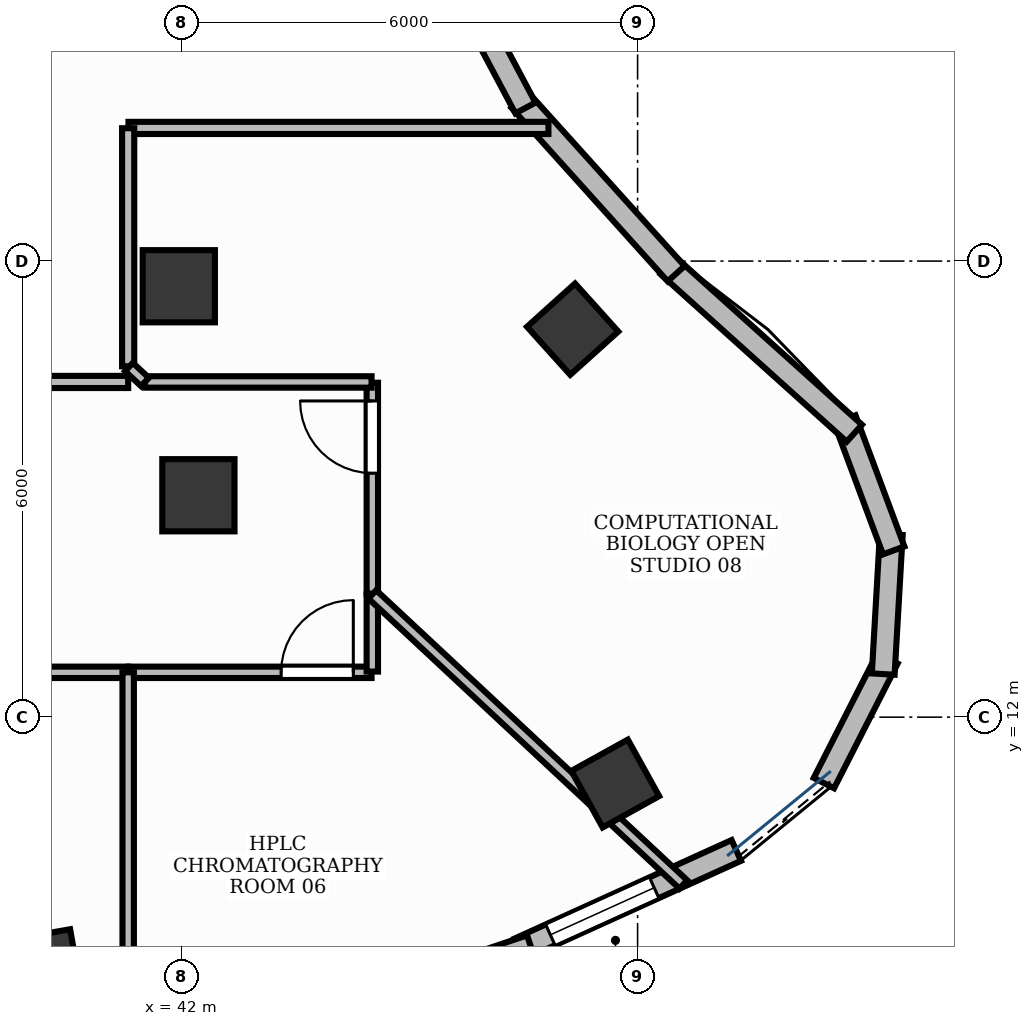
"""IFC4 building model, lengths in metres.
Left out: names, types, materials, properties, quantities, classifications, styles, units other than length and angle.
Written with IfcOpenShell. Run it as: python <this file> out.ifc"""

import sys

from ifc_helpers import new_model, si_unit, direction, frame, frame_2d, origin, origin_2d, place, context, subcontext, project, spatial, rectangle, extrude, element, fill, save


model = new_model("IFC4")
c1 = context("Model", 3, precision=1e-05, world=origin(), true_north=direction((0.0, 1.0)))
c2 = subcontext(c1, "Body", "Model", "MODEL_VIEW")
j1 = project(units=[si_unit("LENGTHUNIT", "METRE"), si_unit("PLANEANGLEUNIT", "RADIAN")], contexts=[c1])
p1 = place(None, origin())
s1 = spatial("IfcSite", under=j1, at=p1, CompositionType="ELEMENT")
p2 = place(p1, origin())
s2 = spatial("IfcBuilding", under=s1, at=p2, CompositionType="ELEMENT")
p3 = place(p2, frame((0.0, 0.0, 260.4)))
s3 = spatial("IfcBuildingStorey", under=s2, at=p3, CompositionType="ELEMENT", Elevation=260.4)
for number, where, z_axis, x_axis in (
    (1, (40.189, 8.718, -0.0), (0.0, 0.0, 1.0), (0.985, 0.173, 0.0)),
    (2, (47.706, 11.127, -0.0), (0.0, 0.0, 1.0), (0.875, 0.485, 0.0)),
):
    element("IfcColumn", number, at=place(p3, frame(where, z_axis=z_axis, x_axis=x_axis)), inside=s3, PredefinedType="COLUMN", context=c2, shape_type="SweptSolid", body=[
        extrude(rectangle(XDim=0.85, YDim=0.85, at=origin_2d()), origin(), (0.0, 0.0, 1.0), 3.901),
    ])
p4 = place(p3, frame((42.222, 14.919, -0.0), z_axis=(0.0, 0.0, 1.0), x_axis=(1.0, 0.0, 0.0)))
e3 = element("IfcColumn", 3, at=p4, inside=s3, PredefinedType="COLUMN", context=c2, shape_type="SweptSolid", body=[
    extrude(rectangle(XDim=0.95, YDim=0.95, at=origin_2d()), origin(), (0.0, 0.0, 1.0), 3.901),
])
p5 = place(p3, frame((47.146, 17.104, -0.0), z_axis=(0.0, 0.0, 1.0), x_axis=(-0.669130606359, 0.743144825477, 0.0)))
e4 = element("IfcColumn", 4, at=p5, inside=s3, PredefinedType="COLUMN", context=c2, shape_type="SweptSolid", body=[
    extrude(rectangle(XDim=0.85, YDim=0.85, at=origin_2d()), origin(), (0.0, 0.0, 1.0), 3.901),
])
p6 = place(p3, frame((41.964, 17.669, -0.0), z_axis=(0.0, 0.0, 1.0), x_axis=(1.0, 0.0, 0.0)))
e5 = element("IfcColumn", 5, at=p6, inside=s3, PredefinedType="COLUMN", context=c2, shape_type="SweptSolid", body=[
    extrude(rectangle(XDim=0.95, YDim=0.95, at=origin_2d()), origin(), (0.0, 0.0, 1.0), 3.901),
])
p7 = place(p3, frame((46.442, 8.95, 0.0), z_axis=(0.0, 0.0, 1.0), x_axis=(0.910590214511, 0.413310369137, 0.0)))
e6 = element("IfcWall", 6, at=p7, inside=s3, PredefinedType="STANDARD", context=c2, shape_type="SweptSolid", body=[
    extrude(rectangle(XDim=3.137, YDim=0.3, at=frame_2d((1.569, 0.0))), origin(), (0.0, 0.0, 1.0), 3.9),
])
p8 = place(p7, frame((0.451, 0.0, 0.95)))
e7 = element("IfcOpeningElement", 7, at=p8, cuts=e6, PredefinedType="OPENING", context=c2, shape_type="SweptSolid", body=[
    extrude(rectangle(XDim=1.5, YDim=1.8, at=frame_2d((0.75, 0.9))), frame((0.0, 0.165, 0.0), z_axis=(0.0, -1.0, 0.0), x_axis=(1.0, 0.0, 0.0)), (0.0, 0.0, 1.0), 0.33),
])
p9 = place(p3, frame((43.52, 7.951, 0.0), z_axis=(0.0, 0.0, 1.0), x_axis=(0.94763187211, 0.319364736566, 0.0)))
e8 = element("IfcWall", 8, at=p9, inside=s3, PredefinedType="STANDARD", context=c2, shape_type="SweptSolid", body=[
    extrude(rectangle(XDim=3.244, YDim=0.3, at=frame_2d((1.622, 0.0))), origin(), (0.0, 0.0, 1.0), 3.9),
])
for number, where, z_axis, x_axis in (
    (9, (50.451, 11.133, 0.0), (0.0, 0.0, 1.0), (0.454, 0.891, 0.0)),
    (10, (51.232, 12.567, 0.0), (0.0, 0.0, 1.0), (0.057, 0.998, 0.0)),
    (11, (51.369, 14.194, 0.0), (0.0, 0.0, 1.0), (-0.349, 0.937, 0.0)),
):
    element("IfcWall", number, at=place(p3, frame(where, z_axis=z_axis, x_axis=x_axis)), inside=s3, PredefinedType="STANDARD", context=c2, shape_type="SweptSolid", body=[
        extrude(rectangle(XDim=1.842, YDim=0.3, at=frame_2d((0.921, 0.0))), origin(), (0.0, 0.0, 1.0), 3.9),
    ])
p10 = place(p3, frame((50.852, 15.736, 0.0), z_axis=(0.0, 0.0, 1.0), x_axis=(-0.743397410822, 0.668849975393, 0.0)))
e12 = element("IfcWall", 12, at=p10, inside=s3, PredefinedType="STANDARD", context=c2, shape_type="SweptSolid", body=[
    extrude(rectangle(XDim=3.291, YDim=0.3, at=frame_2d((1.646, 0.0))), origin(), (0.0, 0.0, 1.0), 3.9),
])
p11 = place(p3, frame((48.508, 17.835, 0.0), z_axis=(0.0, 0.0, 1.0), x_axis=(-0.669127242861, 0.743147853971, 0.0)))
e13 = element("IfcWall", 13, at=p11, inside=s3, PredefinedType="STANDARD", context=c2, shape_type="SweptSolid", body=[
    extrude(rectangle(XDim=3.071, YDim=0.3, at=frame_2d((1.535, 0.0))), origin(), (0.0, 0.0, 1.0), 3.9),
])
p12 = place(p3, frame((46.524, 20.014, 0.0), z_axis=(0.0, 0.0, 1.0), x_axis=(-0.469494296004, 0.882935505017, 0.0)))
e14 = element("IfcWall", 14, at=p12, inside=s3, PredefinedType="STANDARD", context=c2, shape_type="SweptSolid", body=[
    extrude(rectangle(XDim=3.071, YDim=0.3, at=frame_2d((1.535, 0.0))), origin(), (0.0, 0.0, 1.0), 3.9),
])
p13 = place(p3, frame((29.765, 12.59, 0.0), z_axis=(0.0, 0.0, 1.0), x_axis=(1.0, 0.0, 0.0)))
e15 = element("IfcWall", 15, at=p13, inside=s3, PredefinedType="PARTITIONING", context=c2, shape_type="SweptSolid", body=[
    extrude(rectangle(XDim=11.533, YDim=0.15, at=frame_2d((5.767, 0.0))), origin(), (0.0, 0.0, 1.0), 2.91),
])
p14 = place(p13, frame((0.24, 0.0, 0.0)))
e16 = element("IfcOpeningElement", 16, at=p14, cuts=e15, PredefinedType="OPENING", context=c2, shape_type="SweptSolid", body=[
    extrude(rectangle(XDim=0.95, YDim=2.15, at=frame_2d((0.475, 1.075))), frame((0.0, 0.09, 0.0), z_axis=(0.0, -1.0, 0.0), x_axis=(1.0, 0.0, 0.0)), (0.0, 0.0, 1.0), 0.18),
])
p15 = place(p3, frame((41.308, 12.59, 0.0), z_axis=(0.0, 0.0, 1.0), x_axis=(1.0, 0.0, 0.0)))
e17 = element("IfcWall", 17, at=p15, inside=s3, PredefinedType="PARTITIONING", context=c2, shape_type="SweptSolid", body=[
    extrude(rectangle(XDim=3.192, YDim=0.15, at=frame_2d((1.596, 0.0))), origin(), (0.0, 0.0, 1.0), 2.91),
])
p16 = place(p15, frame((2.002, 0.0, 0.0)))
e18 = element("IfcOpeningElement", 18, at=p16, cuts=e17, PredefinedType="OPENING", context=c2, shape_type="SweptSolid", body=[
    extrude(rectangle(XDim=0.95, YDim=2.15, at=frame_2d((0.475, 1.075))), frame((0.0, 0.09, 0.0), z_axis=(0.0, -1.0, 0.0), x_axis=(1.0, 0.0, 0.0)), (0.0, 0.0, 1.0), 0.18),
])
p17 = place(p3, frame((41.298, 16.41, 0.0), z_axis=(0.0, 0.0, 1.0), x_axis=(-1.0, 0.0, 0.0)))
e19 = element("IfcWall", 19, at=p17, inside=s3, PredefinedType="PARTITIONING", context=c2, shape_type="SweptSolid", body=[
    extrude(rectangle(XDim=11.432, YDim=0.16, at=frame_2d((5.716, 0.0))), origin(), (0.0, 0.0, 1.0), 2.91),
])
p18 = place(p17, frame((7.034, 0.0, 0.0)))
e20 = element("IfcOpeningElement", 20, at=p18, cuts=e19, PredefinedType="OPENING", context=c2, shape_type="SweptSolid", body=[
    extrude(rectangle(XDim=0.95, YDim=2.15, at=frame_2d((0.475, 1.075))), frame((0.0, 0.095, 0.0), z_axis=(0.0, -1.0, 0.0), x_axis=(1.0, 0.0, 0.0)), (0.0, 0.0, 1.0), 0.19),
])
p19 = place(p3, frame((44.51, 13.625, 0.0), z_axis=(0.0, 0.0, 1.0), x_axis=(0.0, 1.0, 0.0)))
e21 = element("IfcWall", 21, at=p19, inside=s3, PredefinedType="PARTITIONING", context=c2, shape_type="SweptSolid", body=[
    extrude(rectangle(XDim=2.775, YDim=0.15, at=frame_2d((1.387, 0.0))), origin(), (0.0, 0.0, 1.0), 2.91),
])
p20 = place(p19, frame((1.585, 0.0, 0.0)))
e22 = element("IfcOpeningElement", 22, at=p20, cuts=e21, PredefinedType="OPENING", context=c2, shape_type="SweptSolid", body=[
    extrude(rectangle(XDim=0.95, YDim=2.15, at=frame_2d((0.475, 1.075))), frame((0.0, 0.09, 0.0), z_axis=(0.0, -1.0, 0.0), x_axis=(1.0, 0.0, 0.0)), (0.0, 0.0, 1.0), 0.18),
])
p21 = place(p3, frame((41.298, 12.59, 0.0), z_axis=(0.0, 0.0, 1.0), x_axis=(0.0, -1.0, 0.0)))
e23 = element("IfcWall", 23, at=p21, inside=s3, PredefinedType="PARTITIONING", context=c2, shape_type="SweptSolid", body=[
    extrude(rectangle(XDim=5.261, YDim=0.15, at=frame_2d((2.63, 0.0))), origin(), (0.0, 0.0, 1.0), 2.91),
])
p22 = place(p3, frame((44.51, 12.6, 0.0), z_axis=(0.0, 0.0, 1.0), x_axis=(0.0, 1.0, 0.0)))
e24 = element("IfcWall", 24, at=p22, inside=s3, PredefinedType="PARTITIONING", context=c2, shape_type="SweptSolid", body=[
    extrude(rectangle(XDim=1.015, YDim=0.15, at=frame_2d((0.508, 0.0))), origin(), (0.0, 0.0, 1.0), 2.91),
])
p23 = place(p3, frame((44.51, 13.615, 0.0), z_axis=(0.0, 0.0, 1.0), x_axis=(0.731351206573, -0.682001035662, 0.0)))
e25 = element("IfcWall", 25, at=p23, inside=s3, PredefinedType="PARTITIONING", context=c2, shape_type="SweptSolid", body=[
    extrude(rectangle(XDim=5.595, YDim=0.15, at=frame_2d((2.798, 0.0))), origin(), (0.0, 0.0, 1.0), 2.91),
])
p24 = place(p3, frame((46.827, 19.752, 0.0), z_axis=(0.0, 0.0, 1.0), x_axis=(-1.0, 0.0, 0.0)))
e26 = element("IfcWall", 26, at=p24, inside=s3, PredefinedType="PARTITIONING", context=c2, shape_type="SweptSolid", body=[
    extrude(rectangle(XDim=5.525, YDim=0.16, at=frame_2d((2.762, 0.0))), origin(), (0.0, 0.0, 1.0), 2.91),
])
p25 = place(p3, frame((41.298, 19.748, 0.0), z_axis=(0.0, 0.0, 1.0), x_axis=(0.0, -1.0, 0.0)))
e27 = element("IfcWall", 27, at=p25, inside=s3, PredefinedType="PARTITIONING", context=c2, shape_type="SweptSolid", body=[
    extrude(rectangle(XDim=3.132, YDim=0.16, at=frame_2d((1.566, 0.0))), origin(), (0.0, 0.0, 1.0), 2.91),
])
p26 = place(p3, frame((44.5, 16.41, 0.0), z_axis=(0.0, 0.0, 1.0), x_axis=(-1.0, 0.0, 0.0)))
e28 = element("IfcWall", 28, at=p26, inside=s3, PredefinedType="PARTITIONING", context=c2, shape_type="SweptSolid", body=[
    extrude(rectangle(XDim=2.981, YDim=0.15, at=frame_2d((1.491, 0.0))), origin(), (0.0, 0.0, 1.0), 2.91),
])
p27 = place(p3, frame((41.519, 16.41, 0.0), z_axis=(0.0, 0.0, 1.0), x_axis=(-0.730829938628, 0.682559595057, 0.0)))
e29 = element("IfcWall", 29, at=p27, inside=s3, PredefinedType="PARTITIONING", context=c2, shape_type="SweptSolid", body=[
    extrude(rectangle(XDim=0.288, YDim=0.15, at=frame_2d((0.144, 0.0))), origin(), (0.0, 0.0, 1.0), 2.91),
])
p28 = place(p8, origin())
e30 = element("IfcWindow", 30, at=p28, inside=s3, PartitioningType="DOUBLE_PANEL_VERTICAL", PredefinedType="WINDOW", context=c2, shape_type="SweptSolid", body=[
    extrude(rectangle(XDim=1.5, YDim=1.8, at=frame_2d((0.75, 0.9))), frame((0.0, 0.03, 0.0), z_axis=(0.0, -1.0, 0.0), x_axis=(1.0, 0.0, 0.0)), (0.0, 0.0, 1.0), 0.06),
])
fill(e7, e30)
p29 = place(p16, origin())
e31 = element("IfcDoor", 31, at=p29, inside=s3, OperationType="SINGLE_SWING_RIGHT", PredefinedType="DOOR", context=c2, shape_type="SweptSolid", body=[
    extrude(rectangle(XDim=0.95, YDim=2.15, at=frame_2d((0.475, 1.075))), frame((0.0, 0.025, 0.0), z_axis=(0.0, -1.0, 0.0), x_axis=(1.0, 0.0, 0.0)), (0.0, 0.0, 1.0), 0.05),
])
fill(e18, e31)
p30 = place(p20, origin())
e32 = element("IfcDoor", 32, at=p30, inside=s3, OperationType="SINGLE_SWING_RIGHT", PredefinedType="DOOR", context=c2, shape_type="SweptSolid", body=[
    extrude(rectangle(XDim=0.95, YDim=2.15, at=frame_2d((0.475, 1.075))), frame((0.0, 0.025, 0.0), z_axis=(0.0, -1.0, 0.0), x_axis=(1.0, 0.0, 0.0)), (0.0, 0.0, 1.0), 0.05),
])
fill(e22, e32)
save(model, sys.argv[1])
